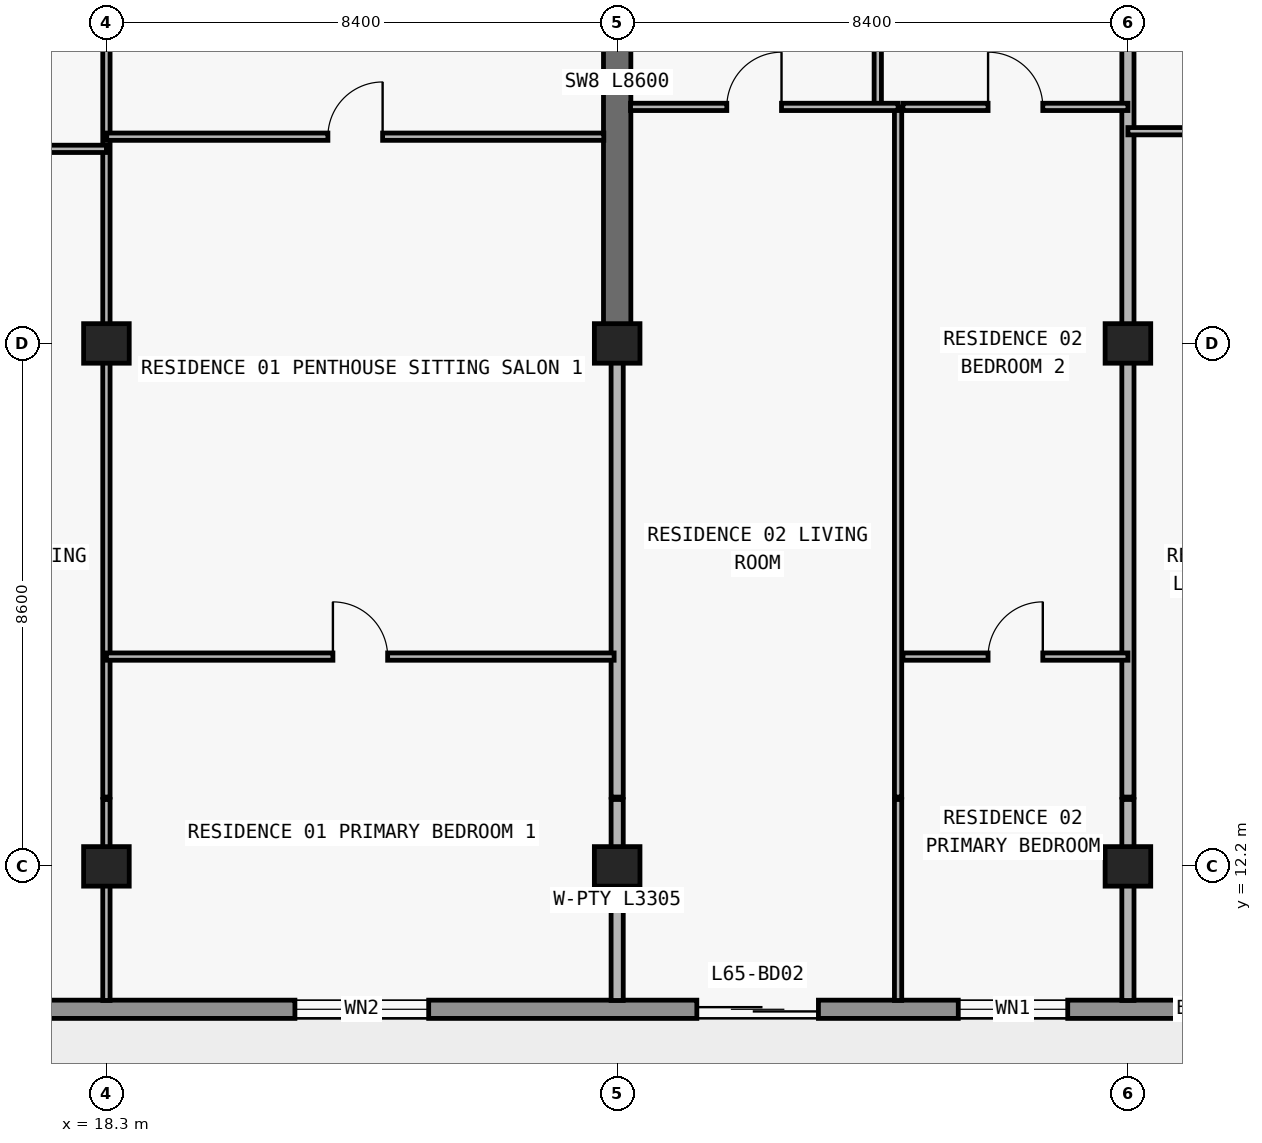
"""IFC4 building model, lengths in metres.
Left out: names, types, materials, properties, quantities, classifications, styles, units other than length and angle.
Written with IfcOpenShell. Run it as: python <this file> out.ifc"""

import sys

from ifc_helpers import new_model, si_unit, direction, frame, frame_2d, origin, origin_2d, place, context, subcontext, project, spatial, rectangle, extrude, element, fill, save


model = new_model("IFC4")
c1 = context("Model", 3, precision=1e-05, world=origin(), true_north=direction((0.0, 1.0)))
c2 = subcontext(c1, "Body", "Model", "MODEL_VIEW")
j1 = project(units=[si_unit("LENGTHUNIT", "METRE"), si_unit("PLANEANGLEUNIT", "RADIAN")], contexts=[c1])
p1 = place(None, origin())
s1 = spatial("IfcSite", under=j1, at=p1, CompositionType="ELEMENT")
p2 = place(p1, origin())
s2 = spatial("IfcBuilding", under=s1, at=p2, CompositionType="ELEMENT")
p3 = place(p2, frame((0.0, 0.0, 233.1)))
s3 = spatial("IfcBuildingStorey", under=s2, at=p3, CompositionType="ELEMENT", Elevation=233.1)
for number, where, z_axis, x_axis in (
    (1, (18.3, 12.2, 0.0), (0.0, 0.0, 1.0), (1.0, 0.0, 0.0)),
    (2, (26.7, 12.2, 0.0), (0.0, 0.0, 1.0), (1.0, 0.0, 0.0)),
    (3, (35.1, 12.2, 0.0), (0.0, 0.0, 1.0), (1.0, 0.0, 0.0)),
    (4, (18.3, 20.8, 0.0), (0.0, 0.0, 1.0), (1.0, 0.0, 0.0)),
    (5, (26.7, 20.8, 0.0), (0.0, 0.0, 1.0), (1.0, 0.0, 0.0)),
    (6, (35.1, 20.8, 0.0), (0.0, 0.0, 1.0), (1.0, 0.0, 0.0)),
):
    element("IfcColumn", number, at=place(p3, frame(where, z_axis=z_axis, x_axis=x_axis)), inside=s3, PredefinedType="COLUMN", context=c2, shape_type="SweptSolid", body=[
        extrude(rectangle(XDim=0.75, YDim=0.65, at=origin_2d()), origin(), (0.0, 0.0, 1.0), 3.05),
    ])
p4 = place(p3, frame((26.7, 20.8, 0.0), z_axis=(0.0, 0.0, 1.0), x_axis=(0.0, 1.0, 0.0)))
e7 = element("IfcWall", 7, at=p4, inside=s3, PredefinedType="SHEAR", context=c2, shape_type="SweptSolid", body=[
    extrude(rectangle(XDim=8.6, YDim=0.45, at=frame_2d((4.3, 0.0))), origin(), (0.0, 0.0, 1.0), 3.05),
])
p5 = place(p3, frame((65.7, 9.85, 0.0), z_axis=(0.0, 0.0, 1.0), x_axis=(-1.0, 0.0, 0.0)))
e8 = element("IfcWall", 8, at=p5, inside=s3, PredefinedType="STANDARD", context=c2, shape_type="SweptSolid", body=[
    extrude(rectangle(XDim=53.6, YDim=0.3, at=frame_2d((26.8, 0.0))), origin(), (0.0, 0.0, 1.0), 3.05),
])
p6 = place(p5, frame((49.5, 0.0, 0.0)))
e9 = element("IfcOpeningElement", 9, at=p6, cuts=e8, PredefinedType="OPENING", context=c2, shape_type="SweptSolid", body=[
    extrude(rectangle(XDim=2.0, YDim=2.3, at=frame_2d((1.0, 1.15))), frame((0.0, 0.16, 0.0), z_axis=(0.0, -1.0, 0.0), x_axis=(1.0, 0.0, 0.0)), (0.0, 0.0, 1.0), 0.32),
])
p7 = place(p5, frame((42.1, 0.0, 0.85)))
e10 = element("IfcOpeningElement", 10, at=p7, cuts=e8, PredefinedType="OPENING", context=c2, shape_type="SweptSolid", body=[
    extrude(rectangle(XDim=2.2, YDim=1.55, at=frame_2d((1.1, 0.775))), frame((0.0, 0.16, 0.0), z_axis=(0.0, -1.0, 0.0), x_axis=(1.0, 0.0, 0.0)), (0.0, 0.0, 1.0), 0.32),
])
p8 = place(p5, frame((35.69, 0.0, 0.0)))
e11 = element("IfcOpeningElement", 11, at=p8, cuts=e8, PredefinedType="OPENING", context=c2, shape_type="SweptSolid", body=[
    extrude(rectangle(XDim=2.0, YDim=2.3, at=frame_2d((1.0, 1.15))), frame((0.0, 0.16, 0.0), z_axis=(0.0, -1.0, 0.0), x_axis=(1.0, 0.0, 0.0)), (0.0, 0.0, 1.0), 0.32),
])
p9 = place(p5, frame((31.59, 0.0, 0.85)))
e12 = element("IfcOpeningElement", 12, at=p9, cuts=e8, PredefinedType="OPENING", context=c2, shape_type="SweptSolid", body=[
    extrude(rectangle(XDim=1.8, YDim=1.55, at=frame_2d((0.9, 0.775))), frame((0.0, 0.16, 0.0), z_axis=(0.0, -1.0, 0.0), x_axis=(1.0, 0.0, 0.0)), (0.0, 0.0, 1.0), 0.32),
])
p10 = place(p5, frame((23.914, 0.0, 0.85)))
e13 = element("IfcOpeningElement", 13, at=p10, cuts=e8, PredefinedType="OPENING", context=c2, shape_type="SweptSolid", body=[
    extrude(rectangle(XDim=2.2, YDim=1.55, at=frame_2d((1.1, 0.775))), frame((0.0, 0.16, 0.0), z_axis=(0.0, -1.0, 0.0), x_axis=(1.0, 0.0, 0.0)), (0.0, 0.0, 1.0), 0.32),
])
p11 = place(p5, frame((19.69, 0.0, 0.0)))
e14 = element("IfcOpeningElement", 14, at=p11, cuts=e8, PredefinedType="OPENING", context=c2, shape_type="SweptSolid", body=[
    extrude(rectangle(XDim=2.0, YDim=2.3, at=frame_2d((1.0, 1.15))), frame((0.0, 0.16, 0.0), z_axis=(0.0, -1.0, 0.0), x_axis=(1.0, 0.0, 0.0)), (0.0, 0.0, 1.0), 0.32),
])
p12 = place(p5, frame((15.59, 0.0, 0.85)))
e15 = element("IfcOpeningElement", 15, at=p12, cuts=e8, PredefinedType="OPENING", context=c2, shape_type="SweptSolid", body=[
    extrude(rectangle(XDim=1.8, YDim=1.55, at=frame_2d((0.9, 0.775))), frame((0.0, 0.16, 0.0), z_axis=(0.0, -1.0, 0.0), x_axis=(1.0, 0.0, 0.0)), (0.0, 0.0, 1.0), 0.32),
])
p13 = place(p5, frame((11.69, 0.0, 0.0)))
e16 = element("IfcOpeningElement", 16, at=p13, cuts=e8, PredefinedType="OPENING", context=c2, shape_type="SweptSolid", body=[
    extrude(rectangle(XDim=2.0, YDim=2.3, at=frame_2d((1.0, 1.15))), frame((0.0, 0.16, 0.0), z_axis=(0.0, -1.0, 0.0), x_axis=(1.0, 0.0, 0.0)), (0.0, 0.0, 1.0), 0.32),
])
p14 = place(p5, frame((7.01, 0.0, 0.65)))
e17 = element("IfcOpeningElement", 17, at=p14, cuts=e8, PredefinedType="OPENING", context=c2, shape_type="SweptSolid", body=[
    extrude(rectangle(XDim=2.6, YDim=1.85, at=frame_2d((1.3, 0.925))), frame((0.0, 0.16, 0.0), z_axis=(0.0, -1.0, 0.0), x_axis=(1.0, 0.0, 0.0)), (0.0, 0.0, 1.0), 0.32),
])
p15 = place(p5, frame((2.0, 0.0, 0.85)))
e18 = element("IfcOpeningElement", 18, at=p15, cuts=e8, PredefinedType="OPENING", context=c2, shape_type="SweptSolid", body=[
    extrude(rectangle(XDim=2.2, YDim=1.55, at=frame_2d((1.1, 0.775))), frame((0.0, 0.16, 0.0), z_axis=(0.0, -1.0, 0.0), x_axis=(1.0, 0.0, 0.0)), (0.0, 0.0, 1.0), 0.32),
])
p16 = place(p3, frame((18.3, 9.995, 0.0), z_axis=(0.0, 0.0, 1.0), x_axis=(0.0, 1.0, 0.0)))
e19 = element("IfcWall", 19, at=p16, inside=s3, PredefinedType="PARTITIONING", context=c2, shape_type="SweptSolid", body=[
    extrude(rectangle(XDim=3.305, YDim=0.12, at=frame_2d((1.652, 0.0))), origin(), (0.0, 0.0, 1.0), 2.263),
])
p17 = place(p3, frame((18.3, 13.34, 0.0), z_axis=(0.0, 0.0, 1.0), x_axis=(0.0, 1.0, 0.0)))
e20 = element("IfcWall", 20, at=p17, inside=s3, PredefinedType="PARTITIONING", context=c2, shape_type="SweptSolid", body=[
    extrude(rectangle(XDim=16.06, YDim=0.12, at=frame_2d((8.03, 0.0))), origin(), (0.0, 0.0, 1.0), 2.263),
])
p18 = place(p17, frame((12.61, 0.0, 0.0)))
e21 = element("IfcOpeningElement", 21, at=p18, cuts=e20, PredefinedType="OPENING", context=c2, shape_type="SweptSolid", body=[
    extrude(rectangle(XDim=0.9, YDim=2.15, at=frame_2d((0.45, 1.075))), frame((0.0, 0.07, 0.0), z_axis=(0.0, -1.0, 0.0), x_axis=(1.0, 0.0, 0.0)), (0.0, 0.0, 1.0), 0.14),
])
p19 = place(p3, frame((26.7, 9.995, 0.0), z_axis=(0.0, 0.0, 1.0), x_axis=(0.0, 1.0, 0.0)))
e22 = element("IfcWall", 22, at=p19, inside=s3, PredefinedType="PARTITIONING", context=c2, shape_type="SweptSolid", body=[
    extrude(rectangle(XDim=3.305, YDim=0.2, at=frame_2d((1.652, 0.0))), origin(), (0.0, 0.0, 1.0), 2.263),
])
p20 = place(p3, frame((26.7, 13.34, 0.0), z_axis=(0.0, 0.0, 1.0), x_axis=(0.0, 1.0, 0.0)))
e23 = element("IfcWall", 23, at=p20, inside=s3, PredefinedType="PARTITIONING", context=c2, shape_type="SweptSolid", body=[
    extrude(rectangle(XDim=7.455, YDim=0.2, at=frame_2d((3.728, 0.0))), origin(), (0.0, 0.0, 1.0), 2.263),
])
p21 = place(p3, frame((30.986, 24.69, 0.0), z_axis=(0.0, 0.0, 1.0), x_axis=(0.0, 1.0, 0.0)))
e24 = element("IfcWall", 24, at=p21, inside=s3, PredefinedType="PARTITIONING", context=c2, shape_type="SweptSolid", body=[
    extrude(rectangle(XDim=4.71, YDim=0.12, at=frame_2d((2.355, 0.0))), origin(), (0.0, 0.0, 1.0), 2.578),
])
p22 = place(p21, frame((1.905, 0.0, 0.0)))
e25 = element("IfcOpeningElement", 25, at=p22, cuts=e24, PredefinedType="OPENING", context=c2, shape_type="SweptSolid", body=[
    extrude(rectangle(XDim=0.9, YDim=2.15, at=frame_2d((0.45, 1.075))), frame((0.0, 0.07, 0.0), z_axis=(0.0, -1.0, 0.0), x_axis=(1.0, 0.0, 0.0)), (0.0, 0.0, 1.0), 0.14),
])
p23 = place(p3, frame((31.32, 9.995, 0.0), z_axis=(0.0, 0.0, 1.0), x_axis=(0.0, 1.0, 0.0)))
e26 = element("IfcWall", 26, at=p23, inside=s3, PredefinedType="PARTITIONING", context=c2, shape_type="SweptSolid", body=[
    extrude(rectangle(XDim=3.305, YDim=0.12, at=frame_2d((1.652, 0.0))), origin(), (0.0, 0.0, 1.0), 3.05),
])
p24 = place(p3, frame((31.32, 13.34, 0.0), z_axis=(0.0, 0.0, 1.0), x_axis=(0.0, 1.0, 0.0)))
e27 = element("IfcWall", 27, at=p24, inside=s3, PredefinedType="PARTITIONING", context=c2, shape_type="SweptSolid", body=[
    extrude(rectangle(XDim=11.35, YDim=0.12, at=frame_2d((5.675, 0.0))), origin(), (0.0, 0.0, 1.0), 3.05),
])
p25 = place(p3, frame((35.1, 9.995, 0.0), z_axis=(0.0, 0.0, 1.0), x_axis=(0.0, 1.0, 0.0)))
e28 = element("IfcWall", 28, at=p25, inside=s3, PredefinedType="PARTITIONING", context=c2, shape_type="SweptSolid", body=[
    extrude(rectangle(XDim=3.305, YDim=0.2, at=frame_2d((1.652, 0.0))), origin(), (0.0, 0.0, 1.0), 2.263),
])
p26 = place(p3, frame((35.1, 13.34, 0.0), z_axis=(0.0, 0.0, 1.0), x_axis=(0.0, 1.0, 0.0)))
e29 = element("IfcWall", 29, at=p26, inside=s3, PredefinedType="PARTITIONING", context=c2, shape_type="SweptSolid", body=[
    extrude(rectangle(XDim=16.06, YDim=0.2, at=frame_2d((8.03, 0.0))), origin(), (0.0, 0.0, 1.0), 2.263),
])
p27 = place(p3, frame((18.3, 15.65, 0.0), z_axis=(0.0, 0.0, 1.0), x_axis=(1.0, 0.0, 0.0)))
e30 = element("IfcWall", 30, at=p27, inside=s3, PredefinedType="PARTITIONING", context=c2, shape_type="SweptSolid", body=[
    extrude(rectangle(XDim=8.35, YDim=0.12, at=frame_2d((4.175, 0.0))), origin(), (0.0, 0.0, 1.0), 3.05),
])
p28 = place(p27, frame((3.725, 0.0, 0.0)))
e31 = element("IfcOpeningElement", 31, at=p28, cuts=e30, PredefinedType="OPENING", context=c2, shape_type="SweptSolid", body=[
    extrude(rectangle(XDim=0.9, YDim=2.15, at=frame_2d((0.45, 1.075))), frame((0.0, 0.07, 0.0), z_axis=(0.0, -1.0, 0.0), x_axis=(1.0, 0.0, 0.0)), (0.0, 0.0, 1.0), 0.14),
])
p29 = place(p3, frame((31.4, 15.65, 0.0), z_axis=(0.0, 0.0, 1.0), x_axis=(1.0, 0.0, 0.0)))
e32 = element("IfcWall", 32, at=p29, inside=s3, PredefinedType="PARTITIONING", context=c2, shape_type="SweptSolid", body=[
    extrude(rectangle(XDim=3.7, YDim=0.12, at=frame_2d((1.85, 0.0))), origin(), (0.0, 0.0, 1.0), 3.05),
])
p30 = place(p29, frame((1.4, 0.0, 0.0)))
e33 = element("IfcOpeningElement", 33, at=p30, cuts=e32, PredefinedType="OPENING", context=c2, shape_type="SweptSolid", body=[
    extrude(rectangle(XDim=0.9, YDim=2.15, at=frame_2d((0.45, 1.075))), frame((0.0, 0.07, 0.0), z_axis=(0.0, -1.0, 0.0), x_axis=(1.0, 0.0, 0.0)), (0.0, 0.0, 1.0), 0.14),
])
p31 = place(p3, frame((12.1, 24.0, 0.0), z_axis=(0.0, 0.0, 1.0), x_axis=(1.0, 0.0, 0.0)))
e34 = element("IfcWall", 34, at=p31, inside=s3, PredefinedType="PARTITIONING", context=c2, shape_type="SweptSolid", body=[
    extrude(rectangle(XDim=6.2, YDim=0.12, at=frame_2d((3.1, 0.0))), origin(), (0.0, 0.0, 1.0), 3.05),
])
p32 = place(p31, frame((2.65, 0.0, 0.0)))
e35 = element("IfcOpeningElement", 35, at=p32, cuts=e34, PredefinedType="OPENING", context=c2, shape_type="SweptSolid", body=[
    extrude(rectangle(XDim=0.9, YDim=2.15, at=frame_2d((0.45, 1.075))), frame((0.0, 0.07, 0.0), z_axis=(0.0, -1.0, 0.0), x_axis=(1.0, 0.0, 0.0)), (0.0, 0.0, 1.0), 0.14),
])
p33 = place(p3, frame((18.305, 24.2, 0.0), z_axis=(0.0, 0.0, 1.0), x_axis=(1.0, 0.0, 0.0)))
e36 = element("IfcWall", 36, at=p33, inside=s3, PredefinedType="PARTITIONING", context=c2, shape_type="SweptSolid", body=[
    extrude(rectangle(XDim=8.175, YDim=0.12, at=frame_2d((4.087, 0.0))), origin(), (0.0, 0.0, 1.0), 3.05),
])
p34 = place(p33, frame((3.637, 0.0, 0.0)))
e37 = element("IfcOpeningElement", 37, at=p34, cuts=e36, PredefinedType="OPENING", context=c2, shape_type="SweptSolid", body=[
    extrude(rectangle(XDim=0.9, YDim=2.15, at=frame_2d((0.45, 1.075))), frame((0.0, 0.07, 0.0), z_axis=(0.0, -1.0, 0.0), x_axis=(1.0, 0.0, 0.0)), (0.0, 0.0, 1.0), 0.14),
])
p35 = place(p3, frame((35.1, 24.29, 0.0), z_axis=(0.0, 0.0, 1.0), x_axis=(1.0, 0.0, 0.0)))
e38 = element("IfcWall", 38, at=p35, inside=s3, PredefinedType="PARTITIONING", context=c2, shape_type="SweptSolid", body=[
    extrude(rectangle(XDim=7.6, YDim=0.12, at=frame_2d((3.8, 0.0))), origin(), (0.0, 0.0, 1.0), 3.05),
])
p36 = place(p35, frame((1.336, 0.0, 0.0)))
e39 = element("IfcOpeningElement", 39, at=p36, cuts=e38, PredefinedType="OPENING", context=c2, shape_type="SweptSolid", body=[
    extrude(rectangle(XDim=0.9, YDim=2.15, at=frame_2d((0.45, 1.075))), frame((0.0, 0.07, 0.0), z_axis=(0.0, -1.0, 0.0), x_axis=(1.0, 0.0, 0.0)), (0.0, 0.0, 1.0), 0.14),
])
p37 = place(p35, frame((5.402, 0.0, 0.0)))
e40 = element("IfcOpeningElement", 40, at=p37, cuts=e38, PredefinedType="OPENING", context=c2, shape_type="SweptSolid", body=[
    extrude(rectangle(XDim=0.9, YDim=2.15, at=frame_2d((0.45, 1.075))), frame((0.0, 0.07, 0.0), z_axis=(0.0, -1.0, 0.0), x_axis=(1.0, 0.0, 0.0)), (0.0, 0.0, 1.0), 0.14),
])
p38 = place(p3, frame((26.92, 24.69, 0.0), z_axis=(0.0, 0.0, 1.0), x_axis=(1.0, 0.0, 0.0)))
e41 = element("IfcWall", 41, at=p38, inside=s3, PredefinedType="PARTITIONING", context=c2, shape_type="SweptSolid", body=[
    extrude(rectangle(XDim=4.4, YDim=0.12, at=frame_2d((2.2, 0.0))), origin(), (0.0, 0.0, 1.0), 3.05),
])
p39 = place(p38, frame((1.583, 0.0, 0.0)))
e42 = element("IfcOpeningElement", 42, at=p39, cuts=e41, PredefinedType="OPENING", context=c2, shape_type="SweptSolid", body=[
    extrude(rectangle(XDim=0.9, YDim=2.15, at=frame_2d((0.45, 1.075))), frame((0.0, 0.07, 0.0), z_axis=(0.0, -1.0, 0.0), x_axis=(1.0, 0.0, 0.0)), (0.0, 0.0, 1.0), 0.14),
])
p40 = place(p3, frame((31.4, 24.69, 0.0), z_axis=(0.0, 0.0, 1.0), x_axis=(1.0, 0.0, 0.0)))
e43 = element("IfcWall", 43, at=p40, inside=s3, PredefinedType="PARTITIONING", context=c2, shape_type="SweptSolid", body=[
    extrude(rectangle(XDim=3.7, YDim=0.12, at=frame_2d((1.85, 0.0))), origin(), (0.0, 0.0, 1.0), 3.05),
])
p41 = place(p40, frame((1.4, 0.0, 0.0)))
e44 = element("IfcOpeningElement", 44, at=p41, cuts=e43, PredefinedType="OPENING", context=c2, shape_type="SweptSolid", body=[
    extrude(rectangle(XDim=0.9, YDim=2.15, at=frame_2d((0.45, 1.075))), frame((0.0, 0.07, 0.0), z_axis=(0.0, -1.0, 0.0), x_axis=(1.0, 0.0, 0.0)), (0.0, 0.0, 1.0), 0.14),
])
p42 = place(p7, origin())
e45 = element("IfcWindow", 45, at=p42, inside=s3, PartitioningType="SINGLE_PANEL", PredefinedType="WINDOW", context=c2, shape_type="SweptSolid", body=[
    extrude(rectangle(XDim=2.2, YDim=1.55, at=frame_2d((1.1, 0.775))), frame((0.0, 0.03, 0.0), z_axis=(0.0, -1.0, 0.0), x_axis=(1.0, 0.0, 0.0)), (0.0, 0.0, 1.0), 0.06),
])
fill(e10, e45)
p43 = place(p8, origin())
e46 = element("IfcDoor", 46, at=p43, inside=s3, OperationType="DOUBLE_DOOR_SLIDING", PredefinedType="DOOR", context=c2, shape_type="SweptSolid", body=[
    extrude(rectangle(XDim=2.0, YDim=2.3, at=frame_2d((1.0, 1.15))), frame((0.0, 0.025, 0.0), z_axis=(0.0, -1.0, 0.0), x_axis=(1.0, 0.0, 0.0)), (0.0, 0.0, 1.0), 0.05),
])
fill(e11, e46)
p44 = place(p9, origin())
e47 = element("IfcWindow", 47, at=p44, inside=s3, PartitioningType="SINGLE_PANEL", PredefinedType="WINDOW", context=c2, shape_type="SweptSolid", body=[
    extrude(rectangle(XDim=1.8, YDim=1.55, at=frame_2d((0.9, 0.775))), frame((0.0, 0.03, 0.0), z_axis=(0.0, -1.0, 0.0), x_axis=(1.0, 0.0, 0.0)), (0.0, 0.0, 1.0), 0.06),
])
fill(e12, e47)
p45 = place(p34, origin())
e48 = element("IfcDoor", 48, at=p45, inside=s3, OperationType="SINGLE_SWING_RIGHT", PredefinedType="DOOR", context=c2, shape_type="SweptSolid", body=[
    extrude(rectangle(XDim=0.9, YDim=2.15, at=frame_2d((0.45, 1.075))), frame((0.0, 0.025, 0.0), z_axis=(0.0, -1.0, 0.0), x_axis=(1.0, 0.0, 0.0)), (0.0, 0.0, 1.0), 0.05),
])
fill(e37, e48)
p46 = place(p28, origin())
e49 = element("IfcDoor", 49, at=p46, inside=s3, OperationType="SINGLE_SWING_LEFT", PredefinedType="DOOR", context=c2, shape_type="SweptSolid", body=[
    extrude(rectangle(XDim=0.9, YDim=2.15, at=frame_2d((0.45, 1.075))), frame((0.0, 0.025, 0.0), z_axis=(0.0, -1.0, 0.0), x_axis=(1.0, 0.0, 0.0)), (0.0, 0.0, 1.0), 0.05),
])
fill(e31, e49)
p47 = place(p39, origin())
e50 = element("IfcDoor", 50, at=p47, inside=s3, OperationType="SINGLE_SWING_RIGHT", PredefinedType="DOOR", context=c2, shape_type="SweptSolid", body=[
    extrude(rectangle(XDim=0.9, YDim=2.15, at=frame_2d((0.45, 1.075))), frame((0.0, 0.025, 0.0), z_axis=(0.0, -1.0, 0.0), x_axis=(1.0, 0.0, 0.0)), (0.0, 0.0, 1.0), 0.05),
])
fill(e42, e50)
p48 = place(p41, origin())
e51 = element("IfcDoor", 51, at=p48, inside=s3, OperationType="SINGLE_SWING_LEFT", PredefinedType="DOOR", context=c2, shape_type="SweptSolid", body=[
    extrude(rectangle(XDim=0.9, YDim=2.15, at=frame_2d((0.45, 1.075))), frame((0.0, 0.025, 0.0), z_axis=(0.0, -1.0, 0.0), x_axis=(1.0, 0.0, 0.0)), (0.0, 0.0, 1.0), 0.05),
])
fill(e44, e51)
p49 = place(p30, origin())
e52 = element("IfcDoor", 52, at=p49, inside=s3, OperationType="SINGLE_SWING_RIGHT", PredefinedType="DOOR", context=c2, shape_type="SweptSolid", body=[
    extrude(rectangle(XDim=0.9, YDim=2.15, at=frame_2d((0.45, 1.075))), frame((0.0, 0.025, 0.0), z_axis=(0.0, -1.0, 0.0), x_axis=(1.0, 0.0, 0.0)), (0.0, 0.0, 1.0), 0.05),
])
fill(e33, e52)
save(model, sys.argv[1])
